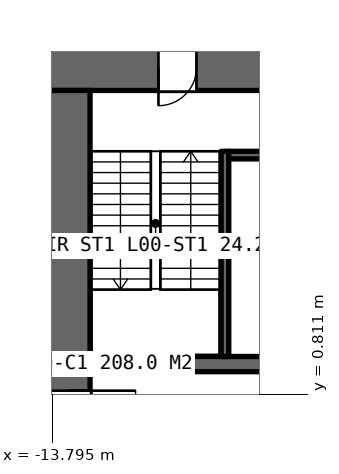
"""IFC4 building model, lengths in metres.
Left out: names, types, materials, properties, quantities, classifications, styles, units other than length and angle.
Written with IfcOpenShell. Run it as: python <this file> out.ifc"""

import sys

from ifc_helpers import new_model, si_unit, direction, frame, frame_2d, origin, place, context, subcontext, project, spatial, rectangle, extrude, element, fill, save


model = new_model("IFC4")
c1 = context("Model", 3, precision=1e-05, world=origin(), true_north=direction((0.0, 1.0)))
c2 = subcontext(c1, "Body", "Model", "MODEL_VIEW")
j1 = project(units=[si_unit("LENGTHUNIT", "METRE"), si_unit("PLANEANGLEUNIT", "RADIAN")], contexts=[c1])
p1 = place(None, origin())
s1 = spatial("IfcSite", under=j1, at=p1, CompositionType="ELEMENT")
p2 = place(p1, origin())
s2 = spatial("IfcBuilding", under=s1, at=p2, CompositionType="ELEMENT")
p3 = place(p2, origin())
s3 = spatial("IfcBuildingStorey", under=s2, at=p3, CompositionType="ELEMENT", Elevation=0.0)
p4 = place(p3, frame((14.0, 9.4, -0.3), z_axis=(0.0, 0.0, 1.0), x_axis=(-1.0, 0.0, 0.0)))
e1 = element("IfcWall", 1, at=p4, inside=s3, PredefinedType="SHEAR", context=c2, shape_type="SweptSolid", body=[
    extrude(rectangle(XDim=28.0, YDim=1.2, at=frame_2d((14.0, 0.0))), origin(), (0.0, 0.0, 1.0), 5.3),
])
p5 = place(p4, frame((24.0, 0.0, 0.3)))
e2 = element("IfcOpeningElement", 2, at=p5, cuts=e1, PredefinedType="OPENING", context=c2, shape_type="SweptSolid", body=[
    extrude(rectangle(XDim=1.0, YDim=2.4, at=frame_2d((0.5, 1.2))), frame((0.0, 0.61, 0.0), z_axis=(0.0, -1.0, 0.0), x_axis=(1.0, 0.0, 0.0)), (0.0, 0.0, 1.0), 1.22),
])
p6 = place(p4, frame((13.1, 0.0, 0.3)))
e3 = element("IfcOpeningElement", 3, at=p6, cuts=e1, PredefinedType="OPENING", context=c2, shape_type="SweptSolid", body=[
    extrude(rectangle(XDim=1.8, YDim=2.4, at=frame_2d((0.9, 1.2))), frame((0.0, 0.61, 0.0), z_axis=(0.0, -1.0, 0.0), x_axis=(1.0, 0.0, 0.0)), (0.0, 0.0, 1.0), 1.22),
])
p7 = place(p3, frame((-13.4, 8.8, -0.3), z_axis=(0.0, 0.0, 1.0), x_axis=(0.0, -1.0, 0.0)))
e4 = element("IfcWall", 4, at=p7, inside=s3, PredefinedType="SHEAR", context=c2, shape_type="SweptSolid", body=[
    extrude(rectangle(XDim=17.6, YDim=1.2, at=frame_2d((8.8, 0.0))), origin(), (0.0, 0.0, 1.0), 5.3),
])
p8 = place(p7, frame((7.9, 0.0, 0.3)))
e5 = element("IfcOpeningElement", 5, at=p8, cuts=e4, PredefinedType="OPENING", context=c2, shape_type="SweptSolid", body=[
    extrude(rectangle(XDim=1.8, YDim=2.4, at=frame_2d((0.9, 1.2))), frame((0.0, 0.61, 0.0), z_axis=(0.0, -1.0, 0.0), x_axis=(1.0, 0.0, 0.0)), (0.0, 0.0, 1.0), 1.22),
])
p9 = place(p7, frame((16.5, 0.0, 0.3)))
e6 = element("IfcOpeningElement", 6, at=p9, cuts=e4, PredefinedType="OPENING", context=c2, shape_type="SweptSolid", body=[
    extrude(rectangle(XDim=1.0, YDim=2.4, at=frame_2d((0.5, 1.2))), frame((0.0, 0.61, 0.0), z_axis=(0.0, -1.0, 0.0), x_axis=(1.0, 0.0, 0.0)), (0.0, 0.0, 1.0), 1.22),
])
p10 = place(p3, frame((-12.8, 1.6, -0.3), z_axis=(0.0, 0.0, 1.0), x_axis=(1.0, 0.0, 0.0)))
e7 = element("IfcWall", 7, at=p10, inside=s3, PredefinedType="SHEAR", context=c2, shape_type="SweptSolid", body=[
    extrude(rectangle(XDim=5.6, YDim=0.4, at=frame_2d((2.8, 0.0))), origin(), (0.0, 0.0, 1.0), 5.3),
])
p11 = place(p3, frame((-9.25, 7.2, -0.3), z_axis=(0.0, 0.0, 1.0), x_axis=(0.0, -1.0, 0.0)))
e8 = element("IfcWall", 8, at=p11, inside=s3, PredefinedType="SOLIDWALL", context=c2, shape_type="SweptSolid", body=[
    extrude(rectangle(XDim=5.4, YDim=0.2, at=frame_2d((2.7, 0.0))), origin(), (0.0, 0.0, 1.0), 5.3),
])
p12 = place(p3, frame((-9.15, 7.1, -0.3), z_axis=(0.0, 0.0, 1.0), x_axis=(1.0, 0.0, 0.0)))
e9 = element("IfcWall", 9, at=p12, inside=s3, PredefinedType="SOLIDWALL", context=c2, shape_type="SweptSolid", body=[
    extrude(rectangle(XDim=1.95, YDim=0.2, at=frame_2d((0.975, 0.0))), origin(), (0.0, 0.0, 1.0), 5.3),
])
p13 = place(p8, origin())
e10 = element("IfcDoor", 10, at=p13, inside=s3, OperationType="DOUBLE_DOOR_SINGLE_SWING", PredefinedType="DOOR", context=c2, shape_type="SweptSolid", body=[
    extrude(rectangle(XDim=1.8, YDim=2.4, at=frame_2d((0.9, 1.2))), frame((0.0, 0.025, 0.0), z_axis=(0.0, -1.0, 0.0), x_axis=(1.0, 0.0, 0.0)), (0.0, 0.0, 1.0), 0.05),
])
fill(e5, e10)
p14 = place(p5, origin())
e11 = element("IfcDoor", 11, at=p14, inside=s3, OperationType="SINGLE_SWING_RIGHT", PredefinedType="DOOR", context=c2, shape_type="SweptSolid", body=[
    extrude(rectangle(XDim=1.0, YDim=2.4, at=frame_2d((0.5, 1.2))), frame((0.0, 0.025, 0.0), z_axis=(0.0, -1.0, 0.0), x_axis=(1.0, 0.0, 0.0)), (0.0, 0.0, 1.0), 0.05),
])
fill(e2, e11)
save(model, sys.argv[1])
